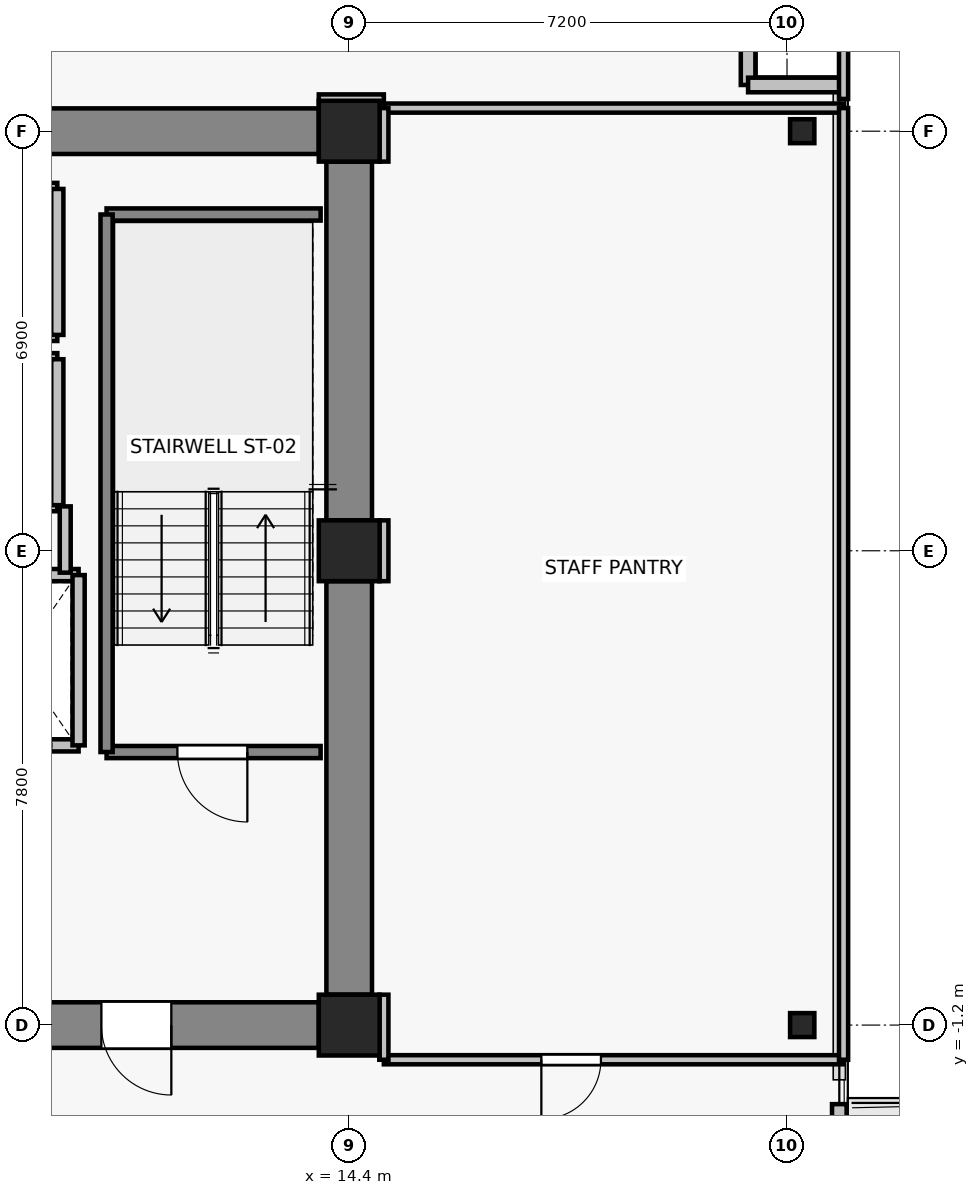
"""IFC4 building model, lengths in metres.
Left out: names, types, materials, properties, quantities, classifications, styles, units other than length and angle.
Written with IfcOpenShell. Run it as: python <this file> out.ifc"""

import sys

from ifc_helpers import new_model, si_unit, direction, frame, frame_2d, origin, origin_2d, place, context, subcontext, project, spatial, rectangle, i_section, extrude, source, transform, mapped, element, fill, save


model = new_model("IFC4")
c1 = context("Model", 3, precision=1e-05, world=origin(), true_north=direction((0.0, 1.0)))
c2 = subcontext(c1, "Body", "Model", "MODEL_VIEW")
j1 = project(units=[si_unit("LENGTHUNIT", "METRE"), si_unit("PLANEANGLEUNIT", "RADIAN")], contexts=[c1])
p1 = place(None, origin())
s1 = spatial("IfcSite", under=j1, at=p1, CompositionType="ELEMENT")
p2 = place(p1, origin())
s2 = spatial("IfcBuilding", under=s1, at=p2, CompositionType="ELEMENT")
p3 = place(p2, frame((0.0, 0.0, 162.7)))
s3 = spatial("IfcBuildingStorey", under=s2, at=p3, CompositionType="ELEMENT", Elevation=162.7)
for number, where, z_axis, x_axis in (
    (1, (14.4, -1.2, 0.0), (0.0, 0.0, 1.0), (1.0, 0.0, 0.0)),
    (2, (14.4, 6.6, 0.0), (0.0, 0.0, 1.0), (1.0, 0.0, 0.0)),
    (3, (14.4, 13.5, 0.0), (0.0, 0.0, 1.0), (1.0, 0.0, 0.0)),
):
    element("IfcColumn", number, at=place(p3, frame(where, z_axis=z_axis, x_axis=x_axis)), inside=s3, PredefinedType="COLUMN", context=c2, shape_type="SweptSolid", body=[
        extrude(rectangle(XDim=1.0, YDim=1.0, at=origin_2d()), origin(), (0.0, 0.0, 1.0), 3.3),
    ])
for number, where, z_axis, x_axis in (
    (4, (21.85, -1.2, 0.0), (0.0, 0.0, 1.0), (1.0, 0.0, 0.0)),
    (5, (21.85, 13.5, 0.0), (0.0, 0.0, 1.0), (1.0, 0.0, 0.0)),
):
    element("IfcColumn", number, at=place(p3, frame(where, z_axis=z_axis, x_axis=x_axis)), inside=s3, PredefinedType="COLUMN", context=c2, shape_type="SweptSolid", body=[
        extrude(i_section(OverallWidth=0.399, OverallDepth=0.394, WebThickness=0.023, FlangeThickness=0.037, FilletRadius=0.015, at=origin_2d()), origin(), (0.0, 0.0, 1.0), 3.3),
    ])
p4 = place(p3, frame((7.7, 13.5, 0.0), z_axis=(0.0, 0.0, 1.0), x_axis=(1.0, 0.0, 0.0)))
e6 = element("IfcWall", 6, at=p4, inside=s3, PredefinedType="SHEAR", context=c2, shape_type="SweptSolid", body=[
    extrude(rectangle(XDim=6.2, YDim=0.75, at=frame_2d((3.1, 0.0))), origin(), (0.0, 0.0, 1.0), 3.075),
])
p5 = place(p3, frame((14.4, -0.7, 0.0), z_axis=(0.0, 0.0, 1.0), x_axis=(0.0, 1.0, 0.0)))
e7 = element("IfcWall", 7, at=p5, inside=s3, PredefinedType="SHEAR", context=c2, shape_type="SweptSolid", body=[
    extrude(rectangle(XDim=6.8, YDim=0.75, at=frame_2d((3.4, 0.0))), origin(), (0.0, 0.0, 1.0), 3.075),
])
p6 = place(p3, frame((14.4, 7.1, 0.0), z_axis=(0.0, 0.0, 1.0), x_axis=(0.0, 1.0, 0.0)))
e8 = element("IfcWall", 8, at=p6, inside=s3, PredefinedType="SHEAR", context=c2, shape_type="SweptSolid", body=[
    extrude(rectangle(XDim=5.9, YDim=0.75, at=frame_2d((2.95, 0.0))), origin(), (0.0, 0.0, 1.0), 3.075),
])
p7 = place(p3, frame((13.9, -1.2, 0.0), z_axis=(0.0, 0.0, 1.0), x_axis=(-1.0, 0.0, 0.0)))
e9 = element("IfcWall", 9, at=p7, inside=s3, PredefinedType="SHEAR", context=c2, shape_type="SweptSolid", body=[
    extrude(rectangle(XDim=6.2, YDim=0.75, at=frame_2d((3.1, 0.0))), origin(), (0.0, 0.0, 1.0), 3.075),
])
p8 = place(p7, frame((2.425, 0.0, 0.0)))
e10 = element("IfcOpeningElement", 10, at=p8, cuts=e9, PredefinedType="OPENING", context=c2, shape_type="SweptSolid", body=[
    extrude(rectangle(XDim=1.15, YDim=2.15, at=frame_2d((0.575, 1.075))), frame((0.0, 0.385, 0.0), z_axis=(0.0, -1.0, 0.0), x_axis=(1.0, 0.0, 0.0)), (0.0, 0.0, 1.0), 0.77),
])
p9 = place(p3, frame((22.46, -2.5, 0.0), z_axis=(0.0, 0.0, 1.0), x_axis=(0.0, -1.0, 0.0)))
e11 = element("IfcWall", 11, at=p9, inside=s3, PredefinedType="SOLIDWALL", context=c2, shape_type="SweptSolid", body=[
    extrude(rectangle(XDim=5.8, YDim=0.24, at=frame_2d((2.9, 0.0))), origin(), (0.0, 0.0, 1.0), 3.075),
])
p10 = place(p9, frame((1.566, 0.0, 0.0)))
e12 = element("IfcOpeningElement", 12, at=p10, cuts=e11, PredefinedType="OPENING", context=c2, shape_type="SweptSolid", body=[
    extrude(rectangle(XDim=1.0, YDim=2.2, at=frame_2d((0.5, 1.1))), frame((0.0, 0.13, 0.0), z_axis=(0.0, -1.0, 0.0), x_axis=(1.0, 0.0, 0.0)), (0.0, 0.0, 1.0), 0.26),
])
p11 = place(p9, frame((2.916, 0.0, 0.85)))
e13 = element("IfcOpeningElement", 13, at=p11, cuts=e11, PredefinedType="OPENING", context=c2, shape_type="SweptSolid", body=[
    extrude(rectangle(XDim=1.5, YDim=1.6, at=frame_2d((0.75, 0.8))), frame((0.0, 0.13, 0.0), z_axis=(0.0, -1.0, 0.0), x_axis=(1.0, 0.0, 0.0)), (0.0, 0.0, 1.0), 0.26),
])
for number, where, z_axis, x_axis in (
    (14, (20.96, 14.26, 0.0), (0.0, 0.0, 1.0), (0.0, 1.0, 0.0)),
    (15, (22.46, 14.26, 0.0), (0.0, 0.0, 1.0), (-1.0, 0.0, 0.0)),
):
    element("IfcWall", number, at=place(p3, frame(where, z_axis=z_axis, x_axis=x_axis)), inside=s3, PredefinedType="SOLIDWALL", context=c2, shape_type="SweptSolid", body=[
        extrude(rectangle(XDim=1.5, YDim=0.24, at=frame_2d((0.75, 0.0))), origin(), (0.0, 0.0, 1.0), 3.075),
    ])
p12 = place(p3, frame((9.95, 3.4, 0.0), z_axis=(0.0, 0.0, 1.0), x_axis=(-1.0, 0.0, 0.0)))
e16 = element("IfcWall", 16, at=p12, inside=s3, PredefinedType="SOLIDWALL", context=c2, shape_type="SweptSolid", body=[
    extrude(rectangle(XDim=2.0, YDim=0.2, at=frame_2d((1.0, 0.0))), origin(), (0.0, 0.0, 1.0), 3.075),
])
p13 = place(p12, frame((0.45, 0.0, 0.0)))
e17 = element("IfcOpeningElement", 17, at=p13, cuts=e16, PredefinedType="OPENING", context=c2, shape_type="SweptSolid", body=[
    extrude(rectangle(XDim=1.1, YDim=2.2, at=frame_2d((0.55, 1.1))), frame((0.0, 0.11, 0.0), z_axis=(0.0, -1.0, 0.0), x_axis=(1.0, 0.0, 0.0)), (0.0, 0.0, 1.0), 0.22),
])
p14 = place(p3, frame((7.95, 6.2, 0.0), z_axis=(0.0, 0.0, 1.0), x_axis=(1.0, 0.0, 0.0)))
e18 = element("IfcWall", 18, at=p14, inside=s3, PredefinedType="SOLIDWALL", context=c2, shape_type="SweptSolid", body=[
    extrude(rectangle(XDim=2.0, YDim=0.2, at=frame_2d((1.0, 0.0))), origin(), (0.0, 0.0, 1.0), 3.075),
])
p15 = place(p3, frame((9.95, 6.2, 0.0), z_axis=(0.0, 0.0, 1.0), x_axis=(0.0, -1.0, 0.0)))
e19 = element("IfcWall", 19, at=p15, inside=s3, PredefinedType="SOLIDWALL", context=c2, shape_type="SweptSolid", body=[
    extrude(rectangle(XDim=2.8, YDim=0.2, at=frame_2d((1.4, 0.0))), origin(), (0.0, 0.0, 1.0), 3.075),
])
for number, where, z_axis, x_axis in (
    (20, (9.6, 7.35, 0.0), (0.0, 0.0, 1.0), (-1.0, 0.0, 0.0)),
    (21, (7.4, 9.75, 0.0), (0.0, 0.0, 1.0), (1.0, 0.0, 0.0)),
):
    element("IfcWall", number, at=place(p3, frame(where, z_axis=z_axis, x_axis=x_axis)), inside=s3, PredefinedType="SOLIDWALL", context=c2, shape_type="SweptSolid", body=[
        extrude(rectangle(XDim=2.2, YDim=0.2, at=frame_2d((1.1, 0.0))), origin(), (0.0, 0.0, 1.0), 2.565),
    ])
p16 = place(p3, frame((9.6, 9.75, 0.0), z_axis=(0.0, 0.0, 1.0), x_axis=(0.0, -1.0, 0.0)))
e22 = element("IfcWall", 22, at=p16, inside=s3, PredefinedType="SOLIDWALL", context=c2, shape_type="SweptSolid", body=[
    extrude(rectangle(XDim=2.4, YDim=0.2, at=frame_2d((1.2, 0.0))), origin(), (0.0, 0.0, 1.0), 3.075),
])
for number, where, z_axis, x_axis in (
    (23, (9.6, 10.15, 0.0), (0.0, 0.0, 1.0), (-1.0, 0.0, 0.0)),
    (24, (7.4, 12.55, 0.0), (0.0, 0.0, 1.0), (1.0, 0.0, 0.0)),
):
    element("IfcWall", number, at=place(p3, frame(where, z_axis=z_axis, x_axis=x_axis)), inside=s3, PredefinedType="SOLIDWALL", context=c2, shape_type="SweptSolid", body=[
        extrude(rectangle(XDim=2.2, YDim=0.2, at=frame_2d((1.1, 0.0))), origin(), (0.0, 0.0, 1.0), 2.565),
    ])
p17 = place(p3, frame((9.6, 12.55, 0.0), z_axis=(0.0, 0.0, 1.0), x_axis=(0.0, -1.0, 0.0)))
e25 = element("IfcWall", 25, at=p17, inside=s3, PredefinedType="SOLIDWALL", context=c2, shape_type="SweptSolid", body=[
    extrude(rectangle(XDim=2.4, YDim=0.2, at=frame_2d((1.2, 0.0))), origin(), (0.0, 0.0, 1.0), 3.075),
])
p18 = place(p3, frame((13.93, 3.29, 0.0), z_axis=(0.0, 0.0, 1.0), x_axis=(-1.0, 0.0, 0.0)))
e26 = element("IfcWall", 26, at=p18, inside=s3, PredefinedType="SOLIDWALL", context=c2, shape_type="SweptSolid", body=[
    extrude(rectangle(XDim=3.52, YDim=0.2, at=frame_2d((1.76, 0.0))), origin(), (0.0, 0.0, 1.0), 3.075),
])
p19 = place(p18, frame((1.205, 0.0, 0.0)))
e27 = element("IfcOpeningElement", 27, at=p19, cuts=e26, PredefinedType="OPENING", context=c2, shape_type="SweptSolid", body=[
    extrude(rectangle(XDim=1.15, YDim=2.15, at=frame_2d((0.575, 1.075))), frame((0.0, 0.11, 0.0), z_axis=(0.0, -1.0, 0.0), x_axis=(1.0, 0.0, 0.0)), (0.0, 0.0, 1.0), 0.22),
])
p20 = place(p3, frame((10.41, 12.13, 0.0), z_axis=(0.0, 0.0, 1.0), x_axis=(1.0, 0.0, 0.0)))
e28 = element("IfcWall", 28, at=p20, inside=s3, PredefinedType="SOLIDWALL", context=c2, shape_type="SweptSolid", body=[
    extrude(rectangle(XDim=3.52, YDim=0.2, at=frame_2d((1.76, 0.0))), origin(), (0.0, 0.0, 1.0), 3.075),
])
p21 = place(p3, frame((10.41, 3.29, 0.0), z_axis=(0.0, 0.0, 1.0), x_axis=(0.0, 1.0, 0.0)))
e29 = element("IfcWall", 29, at=p21, inside=s3, PredefinedType="SOLIDWALL", context=c2, shape_type="SweptSolid", body=[
    extrude(rectangle(XDim=8.84, YDim=0.2, at=frame_2d((4.42, 0.0))), origin(), (0.0, 0.0, 1.0), 3.075),
])
p22 = place(p3, frame((9.73, 7.33, 0.0), z_axis=(0.0, 0.0, 1.0), x_axis=(0.0, -1.0, 0.0)))
e30 = element("IfcWall", 30, at=p22, inside=s3, PredefinedType="PARTITIONING", context=c2, shape_type="SweptSolid", body=[
    extrude(rectangle(XDim=1.09, YDim=0.18, at=frame_2d((0.545, 0.0))), origin(), (0.0, 0.0, 1.0), 3.075),
])
p23 = place(p3, frame((22.53, -1.77, 0.0), z_axis=(0.0, 0.0, 1.0), x_axis=(-1.0, 0.0, 0.0)))
e31 = element("IfcWall", 31, at=p23, inside=s3, PredefinedType="PARTITIONING", context=c2, shape_type="SweptSolid", body=[
    extrude(rectangle(XDim=7.56, YDim=0.15, at=frame_2d((3.78, 0.0))), origin(), (0.0, 0.0, 1.0), 2.565),
])
p24 = place(p23, frame((3.99, 0.0, 0.0)))
e32 = element("IfcOpeningElement", 32, at=p24, cuts=e31, PredefinedType="OPENING", context=c2, shape_type="SweptSolid", body=[
    extrude(rectangle(XDim=0.98, YDim=2.15, at=frame_2d((0.49, 1.075))), frame((0.0, 0.085, 0.0), z_axis=(0.0, -1.0, 0.0), x_axis=(1.0, 0.0, 0.0)), (0.0, 0.0, 1.0), 0.17),
])
p25 = place(p3, frame((14.97, 13.88, 0.0), z_axis=(0.0, 0.0, 1.0), x_axis=(1.0, 0.0, 0.0)))
e33 = element("IfcWall", 33, at=p25, inside=s3, PredefinedType="PARTITIONING", context=c2, shape_type="SweptSolid", body=[
    extrude(rectangle(XDim=7.56, YDim=0.15, at=frame_2d((3.78, 0.0))), origin(), (0.0, 0.0, 1.0), 3.075),
])
p26 = place(p3, frame((14.97, -1.77, 0.0), z_axis=(0.0, 0.0, 1.0), x_axis=(0.0, 1.0, 0.0)))
e34 = element("IfcWall", 34, at=p26, inside=s3, PredefinedType="PARTITIONING", context=c2, shape_type="SweptSolid", body=[
    extrude(rectangle(XDim=1.07, YDim=0.15, at=frame_2d((0.535, 0.0))), origin(), (0.0, 0.0, 1.0), 2.565),
])
p27 = place(p3, frame((14.97, 6.1, 0.0), z_axis=(0.0, 0.0, 1.0), x_axis=(0.0, 1.0, 0.0)))
e35 = element("IfcWall", 35, at=p27, inside=s3, PredefinedType="PARTITIONING", context=c2, shape_type="SweptSolid", body=[
    extrude(rectangle(XDim=1.0, YDim=0.15, at=frame_2d((0.5, 0.0))), origin(), (0.0, 0.0, 1.0), 3.075),
])
p28 = place(p3, frame((14.97, 13.0, 0.0), z_axis=(0.0, 0.0, 1.0), x_axis=(0.0, 1.0, 0.0)))
e36 = element("IfcWall", 36, at=p28, inside=s3, PredefinedType="PARTITIONING", context=c2, shape_type="SweptSolid", body=[
    extrude(rectangle(XDim=0.88, YDim=0.15, at=frame_2d((0.44, 0.0))), origin(), (0.0, 0.0, 1.0), 2.565),
])
p29 = place(p3, frame((22.53, 13.88, 0.0), z_axis=(0.0, 0.0, 1.0), x_axis=(0.0, -1.0, 0.0)))
e37 = element("IfcWall", 37, at=p29, inside=s3, PredefinedType="PARTITIONING", context=c2, shape_type="SweptSolid", body=[
    extrude(rectangle(XDim=15.65, YDim=0.15, at=frame_2d((7.825, 0.0))), origin(), (0.0, 0.0, 1.0), 3.075),
])
p30 = place(p3, frame((14.97, 14.03, 0.0), z_axis=(0.0, 0.0, 1.0), x_axis=(-1.0, 0.0, 0.0)))
e38 = element("IfcWall", 38, at=p30, inside=s3, PredefinedType="PARTITIONING", context=c2, shape_type="SweptSolid", body=[
    extrude(rectangle(XDim=1.07, YDim=0.15, at=frame_2d((0.535, 0.0))), origin(), (0.0, 0.0, 1.0), 2.565),
])
p31 = place(p3, frame((22.53, 17.33, 0.0), z_axis=(0.0, 0.0, 1.0), x_axis=(0.0, -1.0, 0.0)))
e39 = element("IfcWall", 39, at=p31, inside=s3, PredefinedType="PARTITIONING", context=c2, shape_type="SweptSolid", body=[
    extrude(rectangle(XDim=3.3, YDim=0.15, at=frame_2d((1.65, 0.0))), origin(), (0.0, 0.0, 1.0), 3.075),
])
m1 = source(origin(), c2, "Body", "SweptSolid", [
    extrude(rectangle(XDim=1.15, YDim=2.15, at=frame_2d((0.575, 1.075))), frame((0.0, 0.025, 0.0), z_axis=(0.0, -1.0, 0.0), x_axis=(1.0, 0.0, 0.0)), (0.0, 0.0, 1.0), 0.05),
])
p32 = place(p19, origin())
e40 = element("IfcDoor", 40, at=p32, inside=s3, OperationType="SINGLE_SWING_LEFT", PredefinedType="DOOR", context=c2, shape_type="MappedRepresentation", body=[
    mapped(m1, transform((0.0, 0.0, 0.0), x_axis=(1.0, 0.0, 0.0), y_axis=(0.0, 1.0, 0.0), z_axis=(0.0, 0.0, 1.0), scale=1.0)),
])
fill(e27, e40)
p33 = place(p8, origin())
e41 = element("IfcDoor", 41, at=p33, inside=s3, OperationType="SINGLE_SWING_LEFT", PredefinedType="DOOR", context=c2, shape_type="MappedRepresentation", body=[
    mapped(m1, transform((0.0, 0.0, 0.0), x_axis=(1.0, 0.0, 0.0), y_axis=(0.0, 1.0, 0.0), z_axis=(0.0, 0.0, 1.0), scale=1.0)),
])
fill(e10, e41)
m2 = source(origin(), c2, "Body", "SweptSolid", [
    extrude(rectangle(XDim=0.98, YDim=2.15, at=frame_2d((0.49, 1.075))), frame((0.0, 0.025, 0.0), z_axis=(0.0, -1.0, 0.0), x_axis=(1.0, 0.0, 0.0)), (0.0, 0.0, 1.0), 0.05),
])
p34 = place(p24, origin())
e42 = element("IfcDoor", 42, at=p34, inside=s3, OperationType="SINGLE_SWING_RIGHT", PredefinedType="DOOR", context=c2, shape_type="MappedRepresentation", body=[
    mapped(m2, transform((0.0, 0.0, 0.0), x_axis=(1.0, 0.0, 0.0), y_axis=(0.0, 1.0, 0.0), z_axis=(0.0, 0.0, 1.0), scale=1.0)),
])
fill(e32, e42)
save(model, sys.argv[1])
